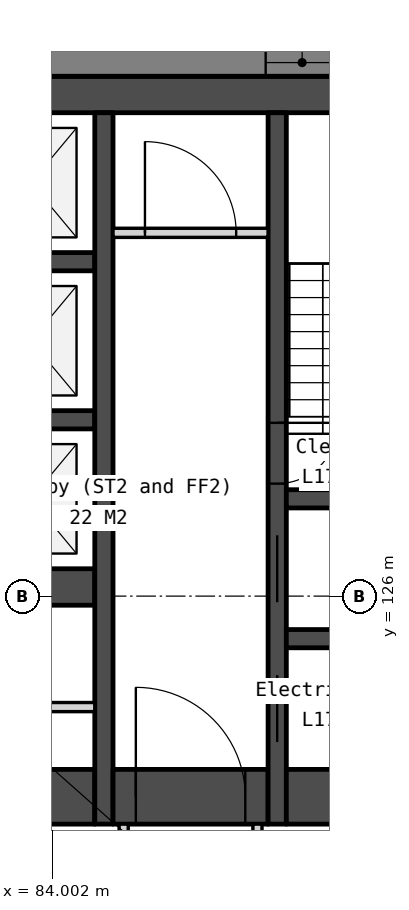
"""IFC4 building model, lengths in metres.
Left out: names, types, materials, properties, quantities, classifications, styles, units other than length and angle.
Written with IfcOpenShell. Run it as: python <this file> out.ifc"""

import sys

from ifc_helpers import new_model, si_unit, direction, frame, frame_2d, origin, place, context, subcontext, project, spatial, polyline, rectangle, outline, extrude, element, fill, save


model = new_model("IFC4")
c1 = context("Model", 3, precision=1e-05, world=origin(), true_north=direction((0.0, 1.0)))
c2 = subcontext(c1, "Body", "Model", "MODEL_VIEW")
j1 = project(units=[si_unit("LENGTHUNIT", "METRE"), si_unit("PLANEANGLEUNIT", "RADIAN")], contexts=[c1])
p1 = place(None, origin())
s1 = spatial("IfcSite", under=j1, at=p1, CompositionType="ELEMENT")
p2 = place(p1, origin())
s2 = spatial("IfcBuilding", under=s1, at=p2, CompositionType="ELEMENT")
p3 = place(p2, frame((0.0, 0.0, 73.5)))
s3 = spatial("IfcBuildingStorey", under=s2, at=p3, CompositionType="ELEMENT", Elevation=73.5)
p4 = place(p3, frame((66.0, 134.25, 0.0), z_axis=(0.0, 0.0, 1.0), x_axis=(1.0, 0.0, 0.0)))
e1 = element("IfcWall", 1, at=p4, inside=s3, PredefinedType="SOLIDWALL", context=c2, shape_type="SweptSolid", body=[
    extrude(rectangle(XDim=28.0, YDim=0.6, at=frame_2d((14.0, 0.0))), origin(), (0.0, 0.0, 1.0), 3.25),
])
p5 = place(p3, frame((81.8, 122.7, 0.0), z_axis=(0.0, 0.0, 1.0), x_axis=(1.0, 0.0, 0.0)))
e2 = element("IfcWall", 2, at=p5, inside=s3, PredefinedType="SOLIDWALL", context=c2, shape_type="SweptSolid", body=[
    extrude(rectangle(XDim=2.9, YDim=0.9, at=frame_2d((1.45, 0.0))), origin(), (0.0, 0.0, 1.0), 3.25),
])
p6 = place(p5, frame((0.05, 0.0, 0.0)))
e3 = element("IfcOpeningElement", 3, at=p6, cuts=e2, PredefinedType="OPENING", context=c2, shape_type="SweptSolid", body=[
    extrude(rectangle(XDim=1.5, YDim=2.1, at=frame_2d((0.75, 1.05))), frame((0.0, 0.46, 0.0), z_axis=(0.0, -1.0, 0.0), x_axis=(1.0, 0.0, 0.0)), (0.0, 0.0, 1.0), 0.92),
])
for number, where, z_axis, x_axis in (
    (4, (82.6, 131.5, 0.0), (0.0, 0.0, 1.0), (1.0, 0.0, 0.0)),
    (5, (82.6, 128.9, 0.0), (0.0, 0.0, 1.0), (1.0, 0.0, 0.0)),
):
    element("IfcWall", number, at=place(p3, frame(where, z_axis=z_axis, x_axis=x_axis)), inside=s3, PredefinedType="SOLIDWALL", context=c2, shape_type="SweptSolid", body=[
        extrude(rectangle(XDim=2.1, YDim=0.3, at=frame_2d((1.05, 0.0))), origin(), (0.0, 0.0, 1.0), 3.25),
    ])
p7 = place(p3, frame((82.6, 126.15, 0.0), z_axis=(0.0, 0.0, 1.0), x_axis=(1.0, 0.0, 0.0)))
e6 = element("IfcWall", 6, at=p7, inside=s3, PredefinedType="SOLIDWALL", context=c2, shape_type="SweptSolid", body=[
    extrude(rectangle(XDim=2.1, YDim=0.6, at=frame_2d((1.05, 0.0))), origin(), (0.0, 0.0, 1.0), 3.25),
])
p8 = place(p3, frame((83.35, 124.175, 0.0), z_axis=(0.0, 0.0, 1.0), x_axis=(1.0, 0.0, 0.0)))
e7 = element("IfcWall", 7, at=p8, inside=s3, PredefinedType="PARTITIONING", context=c2, shape_type="SweptSolid", body=[
    extrude(rectangle(XDim=1.35, YDim=0.15, at=frame_2d((0.675, 0.0))), origin(), (0.0, 0.0, 1.0), 3.25),
])
p9 = place(p3, frame((84.85, 133.95, 0.0), z_axis=(0.0, 0.0, 1.0), x_axis=(0.0, -1.0, 0.0)))
e8 = element("IfcWall", 8, at=p9, inside=s3, PredefinedType="SOLIDWALL", context=c2, shape_type="SweptSolid", body=[
    extrude(rectangle(XDim=11.7, YDim=0.3, at=frame_2d((5.85, 0.0))), origin(), (0.0, 0.0, 1.0), 3.25),
])
p10 = place(p3, frame((85.0, 131.975, 0.0), z_axis=(0.0, 0.0, 1.0), x_axis=(1.0, 0.0, 0.0)))
e9 = element("IfcWall", 9, at=p10, inside=s3, PredefinedType="PARTITIONING", context=c2, shape_type="SweptSolid", body=[
    extrude(rectangle(XDim=2.55, YDim=0.15, at=frame_2d((1.275, 0.0))), origin(), (0.0, 0.0, 1.0), 3.25),
])
p11 = place(p10, frame((0.525, 0.0, 0.0)))
e10 = element("IfcOpeningElement", 10, at=p11, cuts=e9, PredefinedType="OPENING", context=c2, shape_type="SweptSolid", body=[
    extrude(rectangle(XDim=1.5, YDim=2.1, at=frame_2d((0.75, 1.05))), frame((0.0, 0.085, 0.0), z_axis=(0.0, -1.0, 0.0), x_axis=(1.0, 0.0, 0.0)), (0.0, 0.0, 1.0), 0.17),
])
p12 = place(p3, frame((85.0, 122.7, 0.0), z_axis=(0.0, 0.0, 1.0), x_axis=(1.0, 0.0, 0.0)))
e11 = element("IfcWall", 11, at=p12, inside=s3, PredefinedType="SOLIDWALL", context=c2, shape_type="SweptSolid", body=[
    extrude(rectangle(XDim=2.55, YDim=0.9, at=frame_2d((1.275, 0.0))), origin(), (0.0, 0.0, 1.0), 3.25),
])
p13 = place(p12, frame((0.375, 0.0, 0.0)))
e12 = element("IfcOpeningElement", 12, at=p13, cuts=e11, PredefinedType="OPENING", context=c2, shape_type="SweptSolid", body=[
    extrude(rectangle(XDim=1.8, YDim=2.1, at=frame_2d((0.9, 1.05))), frame((0.0, 0.46, 0.0), z_axis=(0.0, -1.0, 0.0), x_axis=(1.0, 0.0, 0.0)), (0.0, 0.0, 1.0), 0.92),
])
p14 = place(p3, frame((85.175, 122.25, 0.0), z_axis=(0.0, 0.0, 1.0), x_axis=(0.0, -1.0, 0.0)))
e13 = element("IfcWall", 13, at=p14, inside=s3, PredefinedType="PARTITIONING", context=c2, shape_type="SweptSolid", body=[
    extrude(rectangle(XDim=2.1, YDim=0.15, at=frame_2d((1.05, 0.0))), origin(), (0.0, 0.0, 1.0), 3.25),
])
p15 = place(p14, frame((0.55, 0.0, 0.0)))
e14 = element("IfcOpeningElement", 14, at=p15, cuts=e13, PredefinedType="OPENING", context=c2, shape_type="SweptSolid", body=[
    extrude(rectangle(XDim=1.0, YDim=2.1, at=frame_2d((0.5, 1.05))), frame((0.0, 0.085, 0.0), z_axis=(0.0, -1.0, 0.0), x_axis=(1.0, 0.0, 0.0)), (0.0, 0.0, 1.0), 0.17),
])
p16 = place(p3, frame((87.375, 122.25, 0.0), z_axis=(0.0, 0.0, 1.0), x_axis=(0.0, -1.0, 0.0)))
e15 = element("IfcWall", 15, at=p16, inside=s3, PredefinedType="PARTITIONING", context=c2, shape_type="SweptSolid", body=[
    extrude(rectangle(XDim=2.1, YDim=0.15, at=frame_2d((1.05, 0.0))), origin(), (0.0, 0.0, 1.0), 3.25),
])
p17 = place(p3, frame((87.7, 133.95, 0.0), z_axis=(0.0, 0.0, 1.0), x_axis=(0.0, -1.0, 0.0)))
e16 = element("IfcWall", 16, at=p17, inside=s3, PredefinedType="SOLIDWALL", context=c2, shape_type="SweptSolid", body=[
    extrude(rectangle(XDim=11.7, YDim=0.3, at=frame_2d((5.85, 0.0))), origin(), (0.0, 0.0, 1.0), 3.25),
])
p18 = place(p17, frame((6.95, 0.0, 0.0)))
e17 = element("IfcOpeningElement", 17, at=p18, cuts=e16, PredefinedType="OPENING", context=c2, shape_type="SweptSolid", body=[
    extrude(rectangle(XDim=1.1, YDim=2.1, at=frame_2d((0.55, 1.05))), frame((0.0, 0.16, 0.0), z_axis=(0.0, -1.0, 0.0), x_axis=(1.0, 0.0, 0.0)), (0.0, 0.0, 1.0), 0.32),
])
p19 = place(p17, frame((5.1, 0.0, 0.0)))
e18 = element("IfcOpeningElement", 18, at=p19, cuts=e16, PredefinedType="OPENING", context=c2, shape_type="SweptSolid", body=[
    extrude(rectangle(XDim=1.0, YDim=2.1, at=frame_2d((0.5, 1.05))), frame((0.0, 0.16, 0.0), z_axis=(0.0, -1.0, 0.0), x_axis=(1.0, 0.0, 0.0)), (0.0, 0.0, 1.0), 0.32),
])
p20 = place(p17, frame((9.25, 0.0, 0.0)))
e19 = element("IfcOpeningElement", 19, at=p20, cuts=e16, PredefinedType="OPENING", context=c2, shape_type="SweptSolid", body=[
    extrude(rectangle(XDim=1.1, YDim=2.1, at=frame_2d((0.55, 1.05))), frame((0.0, 0.16, 0.0), z_axis=(0.0, -1.0, 0.0), x_axis=(1.0, 0.0, 0.0)), (0.0, 0.0, 1.0), 0.32),
])
for number, where, z_axis, x_axis in (
    (20, (87.85, 127.6, 0.0), (0.0, 0.0, 1.0), (1.0, 0.0, 0.0)),
    (21, (87.85, 125.3, 0.0), (0.0, 0.0, 1.0), (1.0, 0.0, 0.0)),
):
    element("IfcWall", number, at=place(p3, frame(where, z_axis=z_axis, x_axis=x_axis)), inside=s3, PredefinedType="SOLIDWALL", context=c2, shape_type="SweptSolid", body=[
        extrude(rectangle(XDim=2.55, YDim=0.3, at=frame_2d((1.275, 0.0))), origin(), (0.0, 0.0, 1.0), 3.25),
    ])
p21 = place(p3, frame((87.85, 122.7, 0.0), z_axis=(0.0, 0.0, 1.0), x_axis=(1.0, 0.0, 0.0)))
e22 = element("IfcWall", 22, at=p21, inside=s3, PredefinedType="SOLIDWALL", context=c2, shape_type="SweptSolid", body=[
    extrude(rectangle(XDim=2.55, YDim=0.9, at=frame_2d((1.275, 0.0))), origin(), (0.0, 0.0, 1.0), 3.25),
])
p22 = place(p3, frame((102.4, 134.775, -0.15), z_axis=(0.0, 0.0, 1.0), x_axis=(-1.0, 0.0, 0.0)))
e23 = element("IfcWall", 23, at=p22, inside=s3, PredefinedType="SOLIDWALL", context=c2, shape_type="SweptSolid", body=[
    extrude(outline(polyline([(44.8, 0.0), (44.8, 3.4), (0.0, 3.4), (0.0, 0.0), (44.8, 0.0)])), frame((0.0, 0.225, 0.0), z_axis=(0.0, -1.0, 0.0), x_axis=(1.0, 0.0, 0.0)), (0.0, 0.0, 1.0), 0.45),
])
p23 = place(p22, frame((3.03, 0.0, 1.05)))
e24 = element("IfcOpeningElement", 24, at=p23, cuts=e23, PredefinedType="OPENING", context=c2, shape_type="SweptSolid", body=[
    extrude(rectangle(XDim=1.2, YDim=1.5, at=frame_2d((0.6, 0.75))), frame((0.0, 0.235, 0.0), z_axis=(0.0, -1.0, 0.0), x_axis=(1.0, 0.0, 0.0)), (0.0, 0.0, 1.0), 0.47),
])
p24 = place(p22, frame((4.73, 0.0, 1.05)))
e25 = element("IfcOpeningElement", 25, at=p24, cuts=e23, PredefinedType="OPENING", context=c2, shape_type="SweptSolid", body=[
    extrude(rectangle(XDim=1.2, YDim=1.5, at=frame_2d((0.6, 0.75))), frame((0.0, 0.235, 0.0), z_axis=(0.0, -1.0, 0.0), x_axis=(1.0, 0.0, 0.0)), (0.0, 0.0, 1.0), 0.47),
])
p25 = place(p22, frame((11.99, 0.0, 1.05)))
e26 = element("IfcOpeningElement", 26, at=p25, cuts=e23, PredefinedType="OPENING", context=c2, shape_type="SweptSolid", body=[
    extrude(rectangle(XDim=1.2, YDim=1.5, at=frame_2d((0.6, 0.75))), frame((0.0, 0.235, 0.0), z_axis=(0.0, -1.0, 0.0), x_axis=(1.0, 0.0, 0.0)), (0.0, 0.0, 1.0), 0.47),
])
p26 = place(p22, frame((13.69, 0.0, 1.05)))
e27 = element("IfcOpeningElement", 27, at=p26, cuts=e23, PredefinedType="OPENING", context=c2, shape_type="SweptSolid", body=[
    extrude(rectangle(XDim=1.2, YDim=1.5, at=frame_2d((0.6, 0.75))), frame((0.0, 0.235, 0.0), z_axis=(0.0, -1.0, 0.0), x_axis=(1.0, 0.0, 0.0)), (0.0, 0.0, 1.0), 0.47),
])
p27 = place(p22, frame((20.95, 0.0, 1.05)))
e28 = element("IfcOpeningElement", 28, at=p27, cuts=e23, PredefinedType="OPENING", context=c2, shape_type="SweptSolid", body=[
    extrude(rectangle(XDim=1.2, YDim=1.5, at=frame_2d((0.6, 0.75))), frame((0.0, 0.235, 0.0), z_axis=(0.0, -1.0, 0.0), x_axis=(1.0, 0.0, 0.0)), (0.0, 0.0, 1.0), 0.47),
])
p28 = place(p22, frame((22.65, 0.0, 1.05)))
e29 = element("IfcOpeningElement", 29, at=p28, cuts=e23, PredefinedType="OPENING", context=c2, shape_type="SweptSolid", body=[
    extrude(rectangle(XDim=1.2, YDim=1.5, at=frame_2d((0.6, 0.75))), frame((0.0, 0.235, 0.0), z_axis=(0.0, -1.0, 0.0), x_axis=(1.0, 0.0, 0.0)), (0.0, 0.0, 1.0), 0.47),
])
p29 = place(p22, frame((29.91, 0.0, 1.05)))
e30 = element("IfcOpeningElement", 30, at=p29, cuts=e23, PredefinedType="OPENING", context=c2, shape_type="SweptSolid", body=[
    extrude(rectangle(XDim=1.2, YDim=1.5, at=frame_2d((0.6, 0.75))), frame((0.0, 0.235, 0.0), z_axis=(0.0, -1.0, 0.0), x_axis=(1.0, 0.0, 0.0)), (0.0, 0.0, 1.0), 0.47),
])
p30 = place(p22, frame((31.61, 0.0, 1.05)))
e31 = element("IfcOpeningElement", 31, at=p30, cuts=e23, PredefinedType="OPENING", context=c2, shape_type="SweptSolid", body=[
    extrude(rectangle(XDim=1.2, YDim=1.5, at=frame_2d((0.6, 0.75))), frame((0.0, 0.235, 0.0), z_axis=(0.0, -1.0, 0.0), x_axis=(1.0, 0.0, 0.0)), (0.0, 0.0, 1.0), 0.47),
])
p31 = place(p22, frame((38.87, 0.0, 1.05)))
e32 = element("IfcOpeningElement", 32, at=p31, cuts=e23, PredefinedType="OPENING", context=c2, shape_type="SweptSolid", body=[
    extrude(rectangle(XDim=1.2, YDim=1.5, at=frame_2d((0.6, 0.75))), frame((0.0, 0.235, 0.0), z_axis=(0.0, -1.0, 0.0), x_axis=(1.0, 0.0, 0.0)), (0.0, 0.0, 1.0), 0.47),
])
p32 = place(p22, frame((40.57, 0.0, 1.05)))
e33 = element("IfcOpeningElement", 33, at=p32, cuts=e23, PredefinedType="OPENING", context=c2, shape_type="SweptSolid", body=[
    extrude(rectangle(XDim=1.2, YDim=1.5, at=frame_2d((0.6, 0.75))), frame((0.0, 0.235, 0.0), z_axis=(0.0, -1.0, 0.0), x_axis=(1.0, 0.0, 0.0)), (0.0, 0.0, 1.0), 0.47),
])
p33 = place(p3, frame((83.105, 90.599, -0.15), z_axis=(0.0, 0.0, 1.0), x_axis=(0.499999201451, 0.866025864826, 0.0)))
e34 = element("IfcWall", 34, at=p33, inside=s3, PredefinedType="SOLIDWALL", context=c2, shape_type="SweptSolid", body=[
    extrude(outline(polyline([(44.8, 0.0), (44.8, 3.4), (0.0, 3.4), (0.0, 0.0), (44.8, 0.0)])), frame((0.0, 0.225, 0.0), z_axis=(0.0, -1.0, 0.0), x_axis=(1.0, 0.0, 0.0)), (0.0, 0.0, 1.0), 0.45),
])
p34 = place(p33, frame((3.03, 0.0, 1.05)))
e35 = element("IfcOpeningElement", 35, at=p34, cuts=e34, PredefinedType="OPENING", context=c2, shape_type="SweptSolid", body=[
    extrude(rectangle(XDim=1.2, YDim=1.5, at=frame_2d((0.6, 0.75))), frame((0.0, 0.235, 0.0), z_axis=(0.0, -1.0, 0.0), x_axis=(1.0, 0.0, 0.0)), (0.0, 0.0, 1.0), 0.47),
])
p35 = place(p33, frame((4.73, 0.0, 1.05)))
e36 = element("IfcOpeningElement", 36, at=p35, cuts=e34, PredefinedType="OPENING", context=c2, shape_type="SweptSolid", body=[
    extrude(rectangle(XDim=1.2, YDim=1.5, at=frame_2d((0.6, 0.75))), frame((0.0, 0.235, 0.0), z_axis=(0.0, -1.0, 0.0), x_axis=(1.0, 0.0, 0.0)), (0.0, 0.0, 1.0), 0.47),
])
p36 = place(p33, frame((11.99, 0.0, 1.05)))
e37 = element("IfcOpeningElement", 37, at=p36, cuts=e34, PredefinedType="OPENING", context=c2, shape_type="SweptSolid", body=[
    extrude(rectangle(XDim=1.2, YDim=1.5, at=frame_2d((0.6, 0.75))), frame((0.0, 0.235, 0.0), z_axis=(0.0, -1.0, 0.0), x_axis=(1.0, 0.0, 0.0)), (0.0, 0.0, 1.0), 0.47),
])
p37 = place(p33, frame((13.69, 0.0, 1.05)))
e38 = element("IfcOpeningElement", 38, at=p37, cuts=e34, PredefinedType="OPENING", context=c2, shape_type="SweptSolid", body=[
    extrude(rectangle(XDim=1.2, YDim=1.5, at=frame_2d((0.6, 0.75))), frame((0.0, 0.235, 0.0), z_axis=(0.0, -1.0, 0.0), x_axis=(1.0, 0.0, 0.0)), (0.0, 0.0, 1.0), 0.47),
])
p38 = place(p33, frame((20.95, 0.0, 1.05)))
e39 = element("IfcOpeningElement", 39, at=p38, cuts=e34, PredefinedType="OPENING", context=c2, shape_type="SweptSolid", body=[
    extrude(rectangle(XDim=1.2, YDim=1.5, at=frame_2d((0.6, 0.75))), frame((0.0, 0.235, 0.0), z_axis=(0.0, -1.0, 0.0), x_axis=(1.0, 0.0, 0.0)), (0.0, 0.0, 1.0), 0.47),
])
p39 = place(p33, frame((22.65, 0.0, 1.05)))
e40 = element("IfcOpeningElement", 40, at=p39, cuts=e34, PredefinedType="OPENING", context=c2, shape_type="SweptSolid", body=[
    extrude(rectangle(XDim=1.2, YDim=1.5, at=frame_2d((0.6, 0.75))), frame((0.0, 0.235, 0.0), z_axis=(0.0, -1.0, 0.0), x_axis=(1.0, 0.0, 0.0)), (0.0, 0.0, 1.0), 0.47),
])
p40 = place(p33, frame((29.91, 0.0, 1.05)))
e41 = element("IfcOpeningElement", 41, at=p40, cuts=e34, PredefinedType="OPENING", context=c2, shape_type="SweptSolid", body=[
    extrude(rectangle(XDim=1.2, YDim=1.5, at=frame_2d((0.6, 0.75))), frame((0.0, 0.235, 0.0), z_axis=(0.0, -1.0, 0.0), x_axis=(1.0, 0.0, 0.0)), (0.0, 0.0, 1.0), 0.47),
])
p41 = place(p33, frame((31.61, 0.0, 1.05)))
e42 = element("IfcOpeningElement", 42, at=p41, cuts=e34, PredefinedType="OPENING", context=c2, shape_type="SweptSolid", body=[
    extrude(rectangle(XDim=1.2, YDim=1.5, at=frame_2d((0.6, 0.75))), frame((0.0, 0.235, 0.0), z_axis=(0.0, -1.0, 0.0), x_axis=(1.0, 0.0, 0.0)), (0.0, 0.0, 1.0), 0.47),
])
p42 = place(p33, frame((38.87, 0.0, 1.05)))
e43 = element("IfcOpeningElement", 43, at=p42, cuts=e34, PredefinedType="OPENING", context=c2, shape_type="SweptSolid", body=[
    extrude(rectangle(XDim=1.2, YDim=1.5, at=frame_2d((0.6, 0.75))), frame((0.0, 0.235, 0.0), z_axis=(0.0, -1.0, 0.0), x_axis=(1.0, 0.0, 0.0)), (0.0, 0.0, 1.0), 0.47),
])
p43 = place(p33, frame((40.57, 0.0, 1.05)))
e44 = element("IfcOpeningElement", 44, at=p43, cuts=e34, PredefinedType="OPENING", context=c2, shape_type="SweptSolid", body=[
    extrude(rectangle(XDim=1.2, YDim=1.5, at=frame_2d((0.6, 0.75))), frame((0.0, 0.235, 0.0), z_axis=(0.0, -1.0, 0.0), x_axis=(1.0, 0.0, 0.0)), (0.0, 0.0, 1.0), 0.47),
])
p44 = place(p18, origin())
e45 = element("IfcDoor", 45, at=p44, inside=s3, OperationType="SLIDING_TO_LEFT", PredefinedType="DOOR", context=c2, shape_type="SweptSolid", body=[
    extrude(rectangle(XDim=1.1, YDim=2.1, at=frame_2d((0.55, 1.05))), frame((0.0, 0.025, 0.0), z_axis=(0.0, -1.0, 0.0), x_axis=(1.0, 0.0, 0.0)), (0.0, 0.0, 1.0), 0.05),
])
fill(e17, e45)
p45 = place(p13, origin())
e46 = element("IfcDoor", 46, at=p45, inside=s3, OperationType="DOUBLE_DOOR_DOUBLE_SWING", PredefinedType="DOOR", context=c2, shape_type="SweptSolid", body=[
    extrude(rectangle(XDim=1.8, YDim=2.1, at=frame_2d((0.9, 1.05))), frame((0.0, 0.025, 0.0), z_axis=(0.0, -1.0, 0.0), x_axis=(1.0, 0.0, 0.0)), (0.0, 0.0, 1.0), 0.05),
])
fill(e12, e46)
p46 = place(p11, origin())
e47 = element("IfcDoor", 47, at=p46, inside=s3, OperationType="DOUBLE_DOOR_DOUBLE_SWING", PredefinedType="DOOR", context=c2, shape_type="SweptSolid", body=[
    extrude(rectangle(XDim=1.5, YDim=2.1, at=frame_2d((0.75, 1.05))), frame((0.0, 0.025, 0.0), z_axis=(0.0, -1.0, 0.0), x_axis=(1.0, 0.0, 0.0)), (0.0, 0.0, 1.0), 0.05),
])
fill(e10, e47)
p47 = place(p19, origin())
e48 = element("IfcDoor", 48, at=p47, inside=s3, OperationType="SINGLE_SWING_LEFT", PredefinedType="DOOR", context=c2, shape_type="SweptSolid", body=[
    extrude(rectangle(XDim=1.0, YDim=2.1, at=frame_2d((0.5, 1.05))), frame((0.0, 0.025, 0.0), z_axis=(0.0, -1.0, 0.0), x_axis=(1.0, 0.0, 0.0)), (0.0, 0.0, 1.0), 0.05),
])
fill(e18, e48)
p48 = place(p20, origin())
e49 = element("IfcDoor", 49, at=p48, inside=s3, OperationType="SLIDING_TO_LEFT", PredefinedType="DOOR", context=c2, shape_type="SweptSolid", body=[
    extrude(rectangle(XDim=1.1, YDim=2.1, at=frame_2d((0.55, 1.05))), frame((0.0, 0.025, 0.0), z_axis=(0.0, -1.0, 0.0), x_axis=(1.0, 0.0, 0.0)), (0.0, 0.0, 1.0), 0.05),
])
fill(e19, e49)
p49 = place(p26, origin())
e50 = element("IfcWindow", 50, at=p49, inside=s3, PartitioningType="SINGLE_PANEL", PredefinedType="WINDOW", context=c2, shape_type="SweptSolid", body=[
    extrude(rectangle(XDim=1.2, YDim=1.5, at=frame_2d((0.6, 0.75))), frame((0.0, 0.03, 0.0), z_axis=(0.0, -1.0, 0.0), x_axis=(1.0, 0.0, 0.0)), (0.0, 0.0, 1.0), 0.06),
])
fill(e27, e50)
save(model, sys.argv[1])
